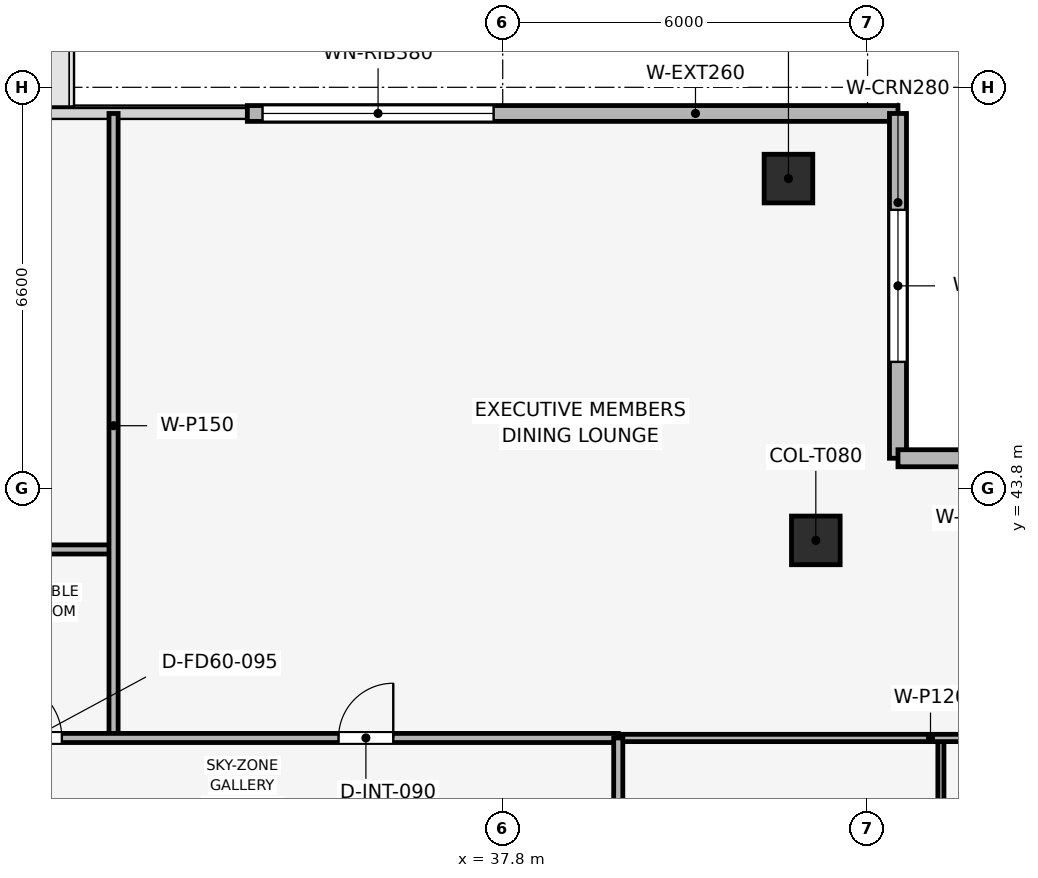
"""IFC4 building model, lengths in metres.
Left out: names, types, materials, properties, quantities, classifications, styles, units other than length and angle.
Written with IfcOpenShell. Run it as: python <this file> out.ifc"""

import sys

from ifc_helpers import new_model, si_unit, direction, frame, frame_2d, origin, origin_2d, place, context, subcontext, project, spatial, rectangle, extrude, element, fill, save


model = new_model("IFC4")
c1 = context("Model", 3, precision=1e-05, world=origin(), true_north=direction((0.0, 1.0)))
c2 = subcontext(c1, "Body", "Model", "MODEL_VIEW")
j1 = project(units=[si_unit("LENGTHUNIT", "METRE"), si_unit("PLANEANGLEUNIT", "RADIAN")], contexts=[c1])
p1 = place(None, origin())
s1 = spatial("IfcSite", under=j1, at=p1, CompositionType="ELEMENT")
p2 = place(p1, origin())
s2 = spatial("IfcBuilding", under=s1, at=p2, CompositionType="ELEMENT")
p3 = place(p2, frame((0.0, 0.0, 351.75)))
s3 = spatial("IfcBuildingStorey", under=s2, at=p3, CompositionType="ELEMENT", Elevation=351.75)
p4 = place(p3, frame((42.499, 48.899, 0.003), z_axis=(-0.178472331722, -0.229560204289, 0.956791377164), x_axis=(0.789476355048, -0.613780974632, 0.0)))
e1 = element("IfcColumn", 1, at=p4, inside=s3, PredefinedType="COLUMN", context=c2, shape_type="SweptSolid", body=[
    extrude(rectangle(XDim=0.8, YDim=0.8, at=origin_2d()), origin(), (0.0, 0.0, 1.0), 3.641),
])
p5 = place(p3, frame((42.949, 42.949, 0.003), z_axis=(-0.18036210228, -0.18036210228, 0.966922449901), x_axis=(0.707106781187, -0.707106781187, 0.0)))
e2 = element("IfcColumn", 2, at=p5, inside=s3, PredefinedType="COLUMN", context=c2, shape_type="SweptSolid", body=[
    extrude(rectangle(XDim=0.8, YDim=0.8, at=origin_2d()), origin(), (0.0, 0.0, 1.0), 3.603),
])
p6 = place(p3, frame((33.6, 49.97, 0.0), z_axis=(0.0, 0.0, 1.0), x_axis=(1.0, 0.0, 0.0)))
e3 = element("IfcWall", 3, at=p6, inside=s3, PredefinedType="SOLIDWALL", context=c2, shape_type="SweptSolid", body=[
    extrude(rectangle(XDim=10.7, YDim=0.26, at=frame_2d((5.35, 0.0))), origin(), (0.0, 0.0, 1.0), 3.49),
])
p7 = place(p6, frame((0.25, 0.0, 0.9)))
e4 = element("IfcOpeningElement", 4, at=p7, cuts=e3, PredefinedType="OPENING", context=c2, shape_type="SweptSolid", body=[
    extrude(rectangle(XDim=3.8, YDim=1.9, at=frame_2d((1.9, 0.95))), frame((0.0, 0.14, 0.0), z_axis=(0.0, -1.0, 0.0), x_axis=(1.0, 0.0, 0.0)), (0.0, 0.0, 1.0), 0.28),
])
p8 = place(p3, frame((44.3, 49.97, 0.0), z_axis=(0.0, 0.0, 1.0), x_axis=(0.0, -1.0, 0.0)))
e5 = element("IfcWall", 5, at=p8, inside=s3, PredefinedType="SOLIDWALL", context=c2, shape_type="SweptSolid", body=[
    extrude(rectangle(XDim=5.67, YDim=0.28, at=frame_2d((2.835, 0.0))), origin(), (0.0, 0.0, 1.0), 3.49),
])
p9 = place(p8, frame((1.585, 0.0, 0.9)))
e6 = element("IfcOpeningElement", 6, at=p9, cuts=e5, PredefinedType="OPENING", context=c2, shape_type="SweptSolid", body=[
    extrude(rectangle(XDim=2.5, YDim=1.9, at=frame_2d((1.25, 0.95))), frame((0.0, 0.15, 0.0), z_axis=(0.0, -1.0, 0.0), x_axis=(1.0, 0.0, 0.0)), (0.0, 0.0, 1.0), 0.3),
])
p10 = place(p3, frame((44.3, 44.3, 0.0), z_axis=(0.0, 0.0, 1.0), x_axis=(1.0, 0.0, 0.0)))
e7 = element("IfcWall", 7, at=p10, inside=s3, PredefinedType="SOLIDWALL", context=c2, shape_type="SweptSolid", body=[
    extrude(rectangle(XDim=5.67, YDim=0.28, at=frame_2d((2.835, 0.0))), origin(), (0.0, 0.0, 1.0), 3.49),
])
p11 = place(p10, frame((1.585, 0.0, 0.9)))
e8 = element("IfcOpeningElement", 8, at=p11, cuts=e7, PredefinedType="OPENING", context=c2, shape_type="SweptSolid", body=[
    extrude(rectangle(XDim=2.5, YDim=1.9, at=frame_2d((1.25, 0.95))), frame((0.0, 0.15, 0.0), z_axis=(0.0, -1.0, 0.0), x_axis=(1.0, 0.0, 0.0)), (0.0, 0.0, 1.0), 0.3),
])
p12 = place(p3, frame((23.0, 42.8, 0.0), z_axis=(0.0, 0.0, 1.0), x_axis=(1.0, 0.0, 0.0)))
e9 = element("IfcWall", 9, at=p12, inside=s3, PredefinedType="PARTITIONING", context=c2, shape_type="SweptSolid", body=[
    extrude(rectangle(XDim=8.4, YDim=0.15, at=frame_2d((4.2, 0.0))), origin(), (0.0, 0.0, 1.0), 3.075),
])
p13 = place(p3, frame((31.4, 39.7, 0.0), z_axis=(0.0, 0.0, 1.0), x_axis=(0.0, 1.0, 0.0)))
e10 = element("IfcWall", 10, at=p13, inside=s3, PredefinedType="PARTITIONING", context=c2, shape_type="SweptSolid", body=[
    extrude(rectangle(XDim=10.27, YDim=0.15, at=frame_2d((5.135, 0.0))), origin(), (0.0, 0.0, 1.0), 3.115),
])
p14 = place(p3, frame((45.006, 24.4, 0.0), z_axis=(0.0, 0.0, 1.0), x_axis=(0.0, 1.0, 0.0)))
e11 = element("IfcWall", 11, at=p14, inside=s3, PredefinedType="MOVABLE", context=c2, shape_type="SweptSolid", body=[
    extrude(rectangle(XDim=15.3, YDim=0.1, at=frame_2d((7.65, 0.0))), origin(), (0.0, 0.0, 1.0), 3.075),
])
p15 = place(p14, frame((10.7, 0.0, 0.0)))
e12 = element("IfcOpeningElement", 12, at=p15, cuts=e11, PredefinedType="OPENING", context=c2, shape_type="SweptSolid", body=[
    extrude(rectangle(XDim=0.9, YDim=2.1, at=frame_2d((0.45, 1.05))), frame((0.0, 0.06, 0.0), z_axis=(0.0, -1.0, 0.0), x_axis=(1.0, 0.0, 0.0)), (0.0, 0.0, 1.0), 0.12),
])
p16 = place(p3, frame((39.7, 39.7, 0.0), z_axis=(0.0, 0.0, 1.0), x_axis=(1.0, 0.0, 0.0)))
e13 = element("IfcWall", 13, at=p16, inside=s3, PredefinedType="PARTITIONING", context=c2, shape_type="SweptSolid", body=[
    extrude(rectangle(XDim=10.27, YDim=0.12, at=frame_2d((5.135, 0.0))), origin(), (0.0, 0.0, 1.0), 3.075),
])
p17 = place(p3, frame((17.9, 39.7, 0.0), z_axis=(0.0, 0.0, 1.0), x_axis=(1.0, 0.0, 0.0)))
e14 = element("IfcWall", 14, at=p17, inside=s3, PredefinedType="PARTITIONING", context=c2, shape_type="SweptSolid", body=[
    extrude(rectangle(XDim=21.8, YDim=0.15, at=frame_2d((10.9, 0.0))), origin(), (0.0, 0.0, 1.0), 3.075),
])
p18 = place(p17, frame((2.1, 0.0, 0.0)))
e15 = element("IfcOpeningElement", 15, at=p18, cuts=e14, PredefinedType="OPENING", context=c2, shape_type="SweptSolid", body=[
    extrude(rectangle(XDim=0.9, YDim=2.1, at=frame_2d((0.45, 1.05))), frame((0.0, 0.085, 0.0), z_axis=(0.0, -1.0, 0.0), x_axis=(1.0, 0.0, 0.0)), (0.0, 0.0, 1.0), 0.17),
])
p19 = place(p17, frame((6.05, 0.0, 0.0)))
e16 = element("IfcOpeningElement", 16, at=p19, cuts=e14, PredefinedType="OPENING", context=c2, shape_type="SweptSolid", body=[
    extrude(rectangle(XDim=0.9, YDim=2.1, at=frame_2d((0.45, 1.05))), frame((0.0, 0.085, 0.0), z_axis=(0.0, -1.0, 0.0), x_axis=(1.0, 0.0, 0.0)), (0.0, 0.0, 1.0), 0.17),
])
p20 = place(p17, frame((8.95, 0.0, 0.0)))
e17 = element("IfcOpeningElement", 17, at=p20, cuts=e14, PredefinedType="OPENING", context=c2, shape_type="SweptSolid", body=[
    extrude(rectangle(XDim=0.9, YDim=2.1, at=frame_2d((0.45, 1.05))), frame((0.0, 0.085, 0.0), z_axis=(0.0, -1.0, 0.0), x_axis=(1.0, 0.0, 0.0)), (0.0, 0.0, 1.0), 0.17),
])
p21 = place(p17, frame((11.7, 0.0, 0.0)))
e18 = element("IfcOpeningElement", 18, at=p21, cuts=e14, PredefinedType="OPENING", context=c2, shape_type="SweptSolid", body=[
    extrude(rectangle(XDim=0.95, YDim=2.1, at=frame_2d((0.475, 1.05))), frame((0.0, 0.085, 0.0), z_axis=(0.0, -1.0, 0.0), x_axis=(1.0, 0.0, 0.0)), (0.0, 0.0, 1.0), 0.17),
])
p22 = place(p17, frame((17.2, 0.0, 0.0)))
e19 = element("IfcOpeningElement", 19, at=p22, cuts=e14, PredefinedType="OPENING", context=c2, shape_type="SweptSolid", body=[
    extrude(rectangle(XDim=0.9, YDim=2.1, at=frame_2d((0.45, 1.05))), frame((0.0, 0.085, 0.0), z_axis=(0.0, -1.0, 0.0), x_axis=(1.0, 0.0, 0.0)), (0.0, 0.0, 1.0), 0.17),
])
p23 = place(p3, frame((39.7, 24.4, 0.0), z_axis=(0.0, 0.0, 1.0), x_axis=(0.0, 1.0, 0.0)))
e20 = element("IfcWall", 20, at=p23, inside=s3, PredefinedType="PARTITIONING", context=c2, shape_type="SweptSolid", body=[
    extrude(rectangle(XDim=15.3, YDim=0.15, at=frame_2d((7.65, 0.0))), origin(), (0.0, 0.0, 1.0), 3.075),
])
p24 = place(p23, frame((7.2, 0.0, 0.0)))
e21 = element("IfcOpeningElement", 21, at=p24, cuts=e20, PredefinedType="OPENING", context=c2, shape_type="SweptSolid", body=[
    extrude(rectangle(XDim=0.9, YDim=2.1, at=frame_2d((0.45, 1.05))), frame((0.0, 0.085, 0.0), z_axis=(0.0, -1.0, 0.0), x_axis=(1.0, 0.0, 0.0)), (0.0, 0.0, 1.0), 0.17),
])
p25 = place(p7, origin())
e22 = element("IfcWindow", 22, at=p25, inside=s3, PartitioningType="SINGLE_PANEL", PredefinedType="WINDOW", context=c2, shape_type="SweptSolid", body=[
    extrude(rectangle(XDim=3.8, YDim=1.9, at=frame_2d((1.9, 0.95))), frame((0.0, 0.03, 0.0), z_axis=(0.0, -1.0, 0.0), x_axis=(1.0, 0.0, 0.0)), (0.0, 0.0, 1.0), 0.06),
])
fill(e4, e22)
p26 = place(p9, origin())
e23 = element("IfcWindow", 23, at=p26, inside=s3, PartitioningType="SINGLE_PANEL", PredefinedType="WINDOW", context=c2, shape_type="SweptSolid", body=[
    extrude(rectangle(XDim=2.5, YDim=1.9, at=frame_2d((1.25, 0.95))), frame((0.0, 0.03, 0.0), z_axis=(0.0, -1.0, 0.0), x_axis=(1.0, 0.0, 0.0)), (0.0, 0.0, 1.0), 0.06),
])
fill(e6, e23)
p27 = place(p21, origin())
e24 = element("IfcDoor", 24, at=p27, inside=s3, OperationType="SINGLE_SWING_LEFT", PredefinedType="DOOR", context=c2, shape_type="SweptSolid", body=[
    extrude(rectangle(XDim=0.95, YDim=2.1, at=frame_2d((0.475, 1.05))), frame((0.0, 0.025, 0.0), z_axis=(0.0, -1.0, 0.0), x_axis=(1.0, 0.0, 0.0)), (0.0, 0.0, 1.0), 0.05),
])
fill(e18, e24)
p28 = place(p22, origin())
e25 = element("IfcDoor", 25, at=p28, inside=s3, OperationType="SINGLE_SWING_RIGHT", PredefinedType="DOOR", context=c2, shape_type="SweptSolid", body=[
    extrude(rectangle(XDim=0.9, YDim=2.1, at=frame_2d((0.45, 1.05))), frame((0.0, 0.025, 0.0), z_axis=(0.0, -1.0, 0.0), x_axis=(1.0, 0.0, 0.0)), (0.0, 0.0, 1.0), 0.05),
])
fill(e19, e25)
save(model, sys.argv[1])
